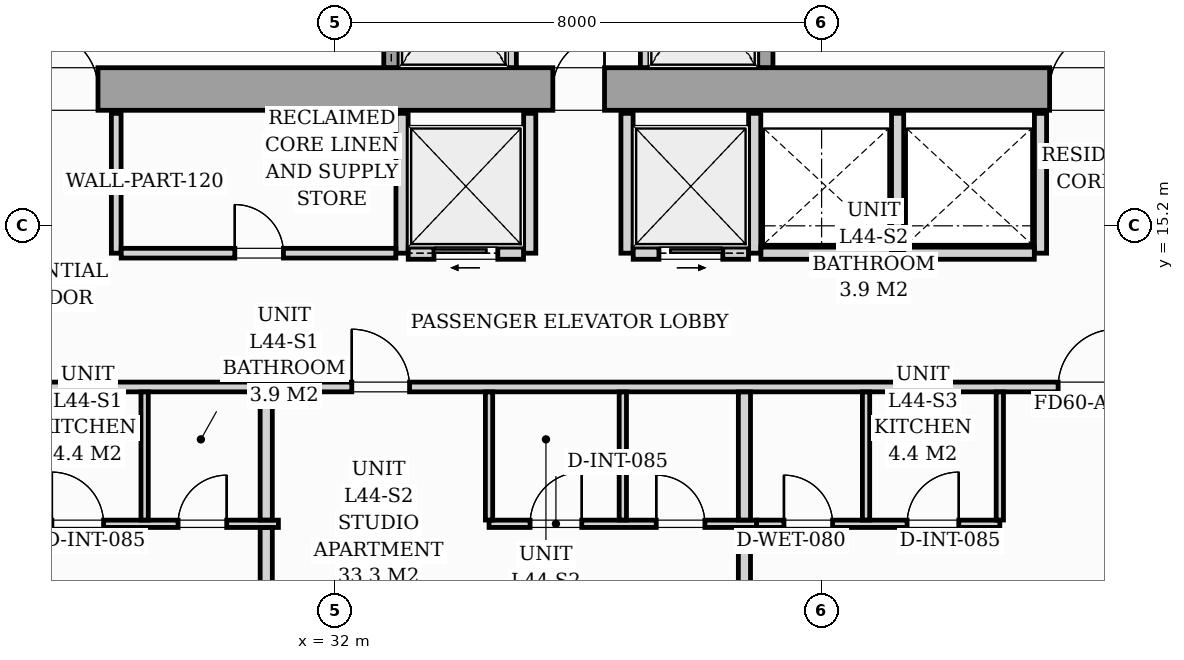
"""IFC4 building model, lengths in metres.
Left out: names, types, materials, properties, quantities, classifications, styles, units other than length and angle.
Written with IfcOpenShell. Run it as: python <this file> out.ifc"""

import sys

from ifc_helpers import new_model, si_unit, direction, frame, frame_2d, origin, origin_2d, place, context, subcontext, project, spatial, rectangle, i_section, extrude, source, transform, mapped, element, fill, save


model = new_model("IFC4")
c1 = context("Model", 3, precision=1e-05, world=origin(), true_north=direction((0.0, 1.0)))
c2 = subcontext(c1, "Body", "Model", "MODEL_VIEW")
j1 = project(units=[si_unit("LENGTHUNIT", "METRE"), si_unit("PLANEANGLEUNIT", "RADIAN")], contexts=[c1])
p1 = place(None, origin())
s1 = spatial("IfcSite", under=j1, at=p1, CompositionType="ELEMENT")
p2 = place(p1, origin())
s2 = spatial("IfcBuilding", under=s1, at=p2, CompositionType="ELEMENT")
p3 = place(p2, frame((0.0, 0.0, 153.4)))
s3 = spatial("IfcBuildingStorey", under=s2, at=p3, CompositionType="ELEMENT", Elevation=153.4)
m1 = source(origin(), c2, "Body", "SweptSolid", [
    extrude(i_section(OverallWidth=0.421, OverallDepth=0.465, WebThickness=0.045, FlangeThickness=0.073, FilletRadius=0.018, at=origin_2d()), origin(), (0.0, 0.0, 1.0), 3.196),
])
for number, where, z_axis, x_axis in (
    (1, (33.12, 17.4, 0.002), (0.0, 0.0, 1.0), (1.0, 0.0, 0.0)),
    (2, (38.88, 17.4, 0.002), (0.0, 0.0, 1.0), (1.0, 0.0, 0.0)),
):
    element("IfcColumn", number, at=place(p3, frame(where, z_axis=z_axis, x_axis=x_axis)), inside=s3, PredefinedType="PILASTER", context=c2, shape_type="MappedRepresentation", body=[
        mapped(m1, transform((0.0, 0.0, 0.0), scale=1.0)),
    ])
p4 = place(p3, frame((26.1, 17.45, 0.0), z_axis=(0.0, 0.0, 1.0), x_axis=(1.0, 0.0, 0.0)))
e3 = element("IfcWall", 3, at=p4, inside=s3, PredefinedType="SHEAR", context=c2, shape_type="SweptSolid", body=[
    extrude(rectangle(XDim=19.8, YDim=0.7, at=frame_2d((9.9, 0.0))), origin(), (0.0, 0.0, 1.0), 3.2),
])
p5 = place(p4, frame((1.05, 0.0, 0.0)))
e4 = element("IfcOpeningElement", 4, at=p5, cuts=e3, PredefinedType="OPENING", context=c2, shape_type="SweptSolid", body=[
    extrude(rectangle(XDim=0.95, YDim=2.06, at=frame_2d((0.475, 1.03))), frame((0.0, 0.36, 0.0), z_axis=(0.0, -1.0, 0.0), x_axis=(1.0, 0.0, 0.0)), (0.0, 0.0, 1.0), 0.72),
])
p6 = place(p4, frame((9.48, 0.0, 0.0)))
e5 = element("IfcOpeningElement", 5, at=p6, cuts=e3, PredefinedType="OPENING", context=c2, shape_type="SweptSolid", body=[
    extrude(rectangle(XDim=0.85, YDim=2.0, at=frame_2d((0.425, 1.0))), frame((0.0, 0.36, 0.0), z_axis=(0.0, -1.0, 0.0), x_axis=(1.0, 0.0, 0.0)), (0.0, 0.0, 1.0), 0.72),
])
p7 = place(p4, frame((17.65, 0.0, 0.0)))
e6 = element("IfcOpeningElement", 6, at=p7, cuts=e3, PredefinedType="OPENING", context=c2, shape_type="SweptSolid", body=[
    extrude(rectangle(XDim=0.95, YDim=2.06, at=frame_2d((0.475, 1.03))), frame((0.0, 0.36, 0.0), z_axis=(0.0, -1.0, 0.0), x_axis=(1.0, 0.0, 0.0)), (0.0, 0.0, 1.0), 0.72),
])
p8 = place(p3, frame((32.925, 17.802, 0.0), z_axis=(0.0, 0.0, 1.0), x_axis=(0.0, 1.0, 0.0)))
e7 = element("IfcWall", 7, at=p8, inside=s3, PredefinedType="SOLIDWALL", context=c2, shape_type="SweptSolid", body=[
    extrude(rectangle(XDim=2.646, YDim=0.25, at=frame_2d((1.323, 0.0))), origin(), (0.0, 0.0, 1.0), 3.2),
])
p9 = place(p8, frame((0.598, 0.0, 0.0)))
e8 = element("IfcOpeningElement", 8, at=p9, cuts=e7, PredefinedType="OPENING", context=c2, shape_type="SweptSolid", body=[
    extrude(rectangle(XDim=1.1, YDim=2.08, at=frame_2d((0.55, 1.04))), frame((0.0, 0.135, 0.0), z_axis=(0.0, -1.0, 0.0), x_axis=(1.0, 0.0, 0.0)), (0.0, 0.0, 1.0), 0.27),
])
for number, where, z_axis, x_axis in (
    (9, (34.9, 17.802, 0.0), (0.0, 0.0, 1.0), (0.0, 1.0, 0.0)),
    (10, (37.1, 17.802, 0.0), (0.0, 0.0, 1.0), (0.0, 1.0, 0.0)),
):
    element("IfcWall", number, at=place(p3, frame(where, z_axis=z_axis, x_axis=x_axis)), inside=s3, PredefinedType="PARTITIONING", context=c2, shape_type="SweptSolid", body=[
        extrude(rectangle(XDim=2.646, YDim=0.16, at=frame_2d((1.323, 0.0))), origin(), (0.0, 0.0, 1.0), 2.94),
    ])
p10 = place(p3, frame((39.075, 17.802, 0.0), z_axis=(0.0, 0.0, 1.0), x_axis=(0.0, 1.0, 0.0)))
e11 = element("IfcWall", 11, at=p10, inside=s3, PredefinedType="SOLIDWALL", context=c2, shape_type="SweptSolid", body=[
    extrude(rectangle(XDim=2.646, YDim=0.25, at=frame_2d((1.323, 0.0))), origin(), (0.0, 0.0, 1.0), 3.2),
])
p11 = place(p10, frame((0.598, 0.0, 0.0)))
e12 = element("IfcOpeningElement", 12, at=p11, cuts=e11, PredefinedType="OPENING", context=c2, shape_type="SweptSolid", body=[
    extrude(rectangle(XDim=1.1, YDim=2.08, at=frame_2d((0.55, 1.04))), frame((0.0, 0.135, 0.0), z_axis=(0.0, -1.0, 0.0), x_axis=(1.0, 0.0, 0.0)), (0.0, 0.0, 1.0), 0.27),
])
p12 = place(p3, frame((28.4, 14.75, 0.0), z_axis=(0.0, 0.0, 1.0), x_axis=(0.0, 1.0, 0.0)))
e13 = element("IfcWall", 13, at=p12, inside=s3, PredefinedType="PARTITIONING", context=c2, shape_type="SweptSolid", body=[
    extrude(rectangle(XDim=2.3, YDim=0.16, at=frame_2d((1.15, 0.0))), origin(), (0.0, 0.0, 1.0), 2.94),
])
p13 = place(p3, frame((33.1, 14.75, 0.0), z_axis=(0.0, 0.0, 1.0), x_axis=(0.0, 1.0, 0.0)))
e14 = element("IfcWall", 14, at=p13, inside=s3, PredefinedType="PARTITIONING", context=c2, shape_type="SweptSolid", body=[
    extrude(rectangle(XDim=2.3, YDim=0.2, at=frame_2d((1.15, 0.0))), origin(), (0.0, 0.0, 1.0), 2.94),
])
p14 = place(p3, frame((28.482, 14.75, 0.0), z_axis=(0.0, 0.0, 1.0), x_axis=(1.0, 0.0, 0.0)))
e15 = element("IfcWall", 15, at=p14, inside=s3, PredefinedType="PARTITIONING", context=c2, shape_type="SweptSolid", body=[
    extrude(rectangle(XDim=4.516, YDim=0.16, at=frame_2d((2.258, 0.0))), origin(), (0.0, 0.0, 1.0), 2.94),
])
p15 = place(p14, frame((1.868, 0.0, 0.0)))
e16 = element("IfcOpeningElement", 16, at=p15, cuts=e15, PredefinedType="OPENING", context=c2, shape_type="SweptSolid", body=[
    extrude(rectangle(XDim=0.8, YDim=2.05, at=frame_2d((0.4, 1.025))), frame((0.0, 0.09, 0.0), z_axis=(0.0, -1.0, 0.0), x_axis=(1.0, 0.0, 0.0)), (0.0, 0.0, 1.0), 0.18),
])
p16 = place(p3, frame((35.2, 14.75, 0.0), z_axis=(0.0, 0.0, 1.0), x_axis=(0.0, 1.0, 0.0)))
e17 = element("IfcWall", 17, at=p16, inside=s3, PredefinedType="PARTITIONING", context=c2, shape_type="SweptSolid", body=[
    extrude(rectangle(XDim=2.3, YDim=0.2, at=frame_2d((1.15, 0.0))), origin(), (0.0, 0.0, 1.0), 2.94),
])
p17 = place(p3, frame((33.202, 14.75, 0.0), z_axis=(0.0, 0.0, 1.0), x_axis=(1.0, 0.0, 0.0)))
e18 = element("IfcWall", 18, at=p17, inside=s3, PredefinedType="PARTITIONING", context=c2, shape_type="SweptSolid", body=[
    extrude(rectangle(XDim=1.896, YDim=0.2, at=frame_2d((0.948, 0.0))), origin(), (0.0, 0.0, 1.0), 2.94),
])
p18 = place(p17, frame((0.423, 0.0, 0.0)))
e19 = element("IfcOpeningElement", 19, at=p18, cuts=e18, PredefinedType="OPENING", context=c2, shape_type="SweptSolid", body=[
    extrude(rectangle(XDim=1.05, YDim=2.08, at=frame_2d((0.525, 1.04))), frame((0.0, 0.11, 0.0), z_axis=(0.0, -1.0, 0.0), x_axis=(1.0, 0.0, 0.0)), (0.0, 0.0, 1.0), 0.22),
])
for number, where, z_axis, x_axis in (
    (20, (36.8, 14.75, 0.0), (0.0, 0.0, 1.0), (0.0, 1.0, 0.0)),
    (21, (38.9, 14.75, 0.0), (0.0, 0.0, 1.0), (0.0, 1.0, 0.0)),
):
    element("IfcWall", number, at=place(p3, frame(where, z_axis=z_axis, x_axis=x_axis)), inside=s3, PredefinedType="PARTITIONING", context=c2, shape_type="SweptSolid", body=[
        extrude(rectangle(XDim=2.3, YDim=0.2, at=frame_2d((1.15, 0.0))), origin(), (0.0, 0.0, 1.0), 2.94),
    ])
p19 = place(p3, frame((36.902, 14.75, 0.0), z_axis=(0.0, 0.0, 1.0), x_axis=(1.0, 0.0, 0.0)))
e22 = element("IfcWall", 22, at=p19, inside=s3, PredefinedType="PARTITIONING", context=c2, shape_type="SweptSolid", body=[
    extrude(rectangle(XDim=1.896, YDim=0.2, at=frame_2d((0.948, 0.0))), origin(), (0.0, 0.0, 1.0), 2.94),
])
p20 = place(p19, frame((0.423, 0.0, 0.0)))
e23 = element("IfcOpeningElement", 23, at=p20, cuts=e22, PredefinedType="OPENING", context=c2, shape_type="SweptSolid", body=[
    extrude(rectangle(XDim=1.05, YDim=2.08, at=frame_2d((0.525, 1.04))), frame((0.0, 0.11, 0.0), z_axis=(0.0, -1.0, 0.0), x_axis=(1.0, 0.0, 0.0)), (0.0, 0.0, 1.0), 0.22),
])
for number, where, z_axis, x_axis in (
    (24, (41.25, 14.75, 0.0), (0.0, 0.0, 1.0), (0.0, 1.0, 0.0)),
    (25, (43.6, 14.75, 0.0), (0.0, 0.0, 1.0), (0.0, 1.0, 0.0)),
):
    element("IfcWall", number, at=place(p3, frame(where, z_axis=z_axis, x_axis=x_axis)), inside=s3, PredefinedType="PARTITIONING", context=c2, shape_type="SweptSolid", body=[
        extrude(rectangle(XDim=2.3, YDim=0.2, at=frame_2d((1.15, 0.0))), origin(), (0.0, 0.0, 1.0), 2.94),
    ])
for number, where, z_axis, x_axis in (
    (26, (39.002, 14.75, 0.0), (0.0, 0.0, 1.0), (1.0, 0.0, 0.0)),
    (27, (41.352, 14.75, 0.0), (0.0, 0.0, 1.0), (1.0, 0.0, 0.0)),
):
    element("IfcWall", number, at=place(p3, frame(where, z_axis=z_axis, x_axis=x_axis)), inside=s3, PredefinedType="PARTITIONING", context=c2, shape_type="SweptSolid", body=[
        extrude(rectangle(XDim=2.146, YDim=0.2, at=frame_2d((1.073, 0.0))), origin(), (0.0, 0.0, 1.0), 2.94),
    ])
p21 = place(p3, frame((22.05, 12.55, 0.0), z_axis=(0.0, 0.0, 1.0), x_axis=(1.0, 0.0, 0.0)))
e28 = element("IfcWall", 28, at=p21, inside=s3, PredefinedType="PARTITIONING", context=c2, shape_type="SweptSolid", body=[
    extrude(rectangle(XDim=23.83, YDim=0.16, at=frame_2d((11.915, 0.0))), origin(), (0.0, 0.0, 1.0), 2.94),
])
p22 = place(p21, frame((1.873, 0.0, 0.0)))
e29 = element("IfcOpeningElement", 29, at=p22, cuts=e28, PredefinedType="OPENING", context=c2, shape_type="SweptSolid", body=[
    extrude(rectangle(XDim=0.95, YDim=2.06, at=frame_2d((0.475, 1.03))), frame((0.0, 0.09, 0.0), z_axis=(0.0, -1.0, 0.0), x_axis=(1.0, 0.0, 0.0)), (0.0, 0.0, 1.0), 0.18),
])
p23 = place(p21, frame((10.224, 0.0, 0.0)))
e30 = element("IfcOpeningElement", 30, at=p23, cuts=e28, PredefinedType="OPENING", context=c2, shape_type="SweptSolid", body=[
    extrude(rectangle(XDim=0.95, YDim=2.06, at=frame_2d((0.475, 1.03))), frame((0.0, 0.09, 0.0), z_axis=(0.0, -1.0, 0.0), x_axis=(1.0, 0.0, 0.0)), (0.0, 0.0, 1.0), 0.18),
])
p24 = place(p21, frame((21.84, 0.0, 0.0)))
e31 = element("IfcOpeningElement", 31, at=p24, cuts=e28, PredefinedType="OPENING", context=c2, shape_type="SweptSolid", body=[
    extrude(rectangle(XDim=0.95, YDim=2.06, at=frame_2d((0.475, 1.03))), frame((0.0, 0.09, 0.0), z_axis=(0.0, -1.0, 0.0), x_axis=(1.0, 0.0, 0.0)), (0.0, 0.0, 1.0), 0.18),
])
p25 = place(p3, frame((26.667, 10.3, 0.0), z_axis=(0.0, 0.0, 1.0), x_axis=(1.0, 0.0, 0.0)))
e32 = element("IfcWall", 32, at=p25, inside=s3, PredefinedType="PARTITIONING", context=c2, shape_type="SweptSolid", body=[
    extrude(rectangle(XDim=4.4, YDim=0.12, at=frame_2d((2.2, 0.0))), origin(), (0.0, 0.0, 1.0), 2.94),
])
p26 = place(p25, frame((0.675, 0.0, 0.0)))
e33 = element("IfcOpeningElement", 33, at=p26, cuts=e32, PredefinedType="OPENING", context=c2, shape_type="SweptSolid", body=[
    extrude(rectangle(XDim=0.85, YDim=2.05, at=frame_2d((0.425, 1.025))), frame((0.0, 0.07, 0.0), z_axis=(0.0, -1.0, 0.0), x_axis=(1.0, 0.0, 0.0)), (0.0, 0.0, 1.0), 0.14),
])
p27 = place(p25, frame((2.75, 0.0, 0.0)))
e34 = element("IfcOpeningElement", 34, at=p27, cuts=e32, PredefinedType="OPENING", context=c2, shape_type="SweptSolid", body=[
    extrude(rectangle(XDim=0.8, YDim=2.02, at=frame_2d((0.4, 1.01))), frame((0.0, 0.07, 0.0), z_axis=(0.0, -1.0, 0.0), x_axis=(1.0, 0.0, 0.0)), (0.0, 0.0, 1.0), 0.14),
])
p28 = place(p3, frame((28.867, 10.362, 0.0), z_axis=(0.0, 0.0, 1.0), x_axis=(0.0, 1.0, 0.0)))
e35 = element("IfcWall", 35, at=p28, inside=s3, PredefinedType="PARTITIONING", context=c2, shape_type="SweptSolid", body=[
    extrude(rectangle(XDim=2.106, YDim=0.12, at=frame_2d((1.053, 0.0))), origin(), (0.0, 0.0, 1.0), 2.94),
])
p29 = place(p3, frame((30.867, 7.221, 0.0), z_axis=(0.0, 0.0, 1.0), x_axis=(0.0, 1.0, 0.0)))
e36 = element("IfcWall", 36, at=p29, inside=s3, PredefinedType="PARTITIONING", context=c2, shape_type="SweptSolid", body=[
    extrude(rectangle(XDim=3.017, YDim=0.2, at=frame_2d((1.508, 0.0))), origin(), (0.0, 0.0, 1.0), 2.94),
])
p30 = place(p3, frame((30.867, 10.362, 0.0), z_axis=(0.0, 0.0, 1.0), x_axis=(0.0, 1.0, 0.0)))
e37 = element("IfcWall", 37, at=p30, inside=s3, PredefinedType="PARTITIONING", context=c2, shape_type="SweptSolid", body=[
    extrude(rectangle(XDim=2.106, YDim=0.2, at=frame_2d((1.053, 0.0))), origin(), (0.0, 0.0, 1.0), 2.94),
])
p31 = place(p3, frame((34.531, 10.3, 0.0), z_axis=(0.0, 0.0, 1.0), x_axis=(1.0, 0.0, 0.0)))
e38 = element("IfcWall", 38, at=p31, inside=s3, PredefinedType="PARTITIONING", context=c2, shape_type="SweptSolid", body=[
    extrude(rectangle(XDim=4.4, YDim=0.12, at=frame_2d((2.2, 0.0))), origin(), (0.0, 0.0, 1.0), 2.94),
])
p32 = place(p31, frame((0.675, 0.0, 0.0)))
e39 = element("IfcOpeningElement", 39, at=p32, cuts=e38, PredefinedType="OPENING", context=c2, shape_type="SweptSolid", body=[
    extrude(rectangle(XDim=0.85, YDim=2.05, at=frame_2d((0.425, 1.025))), frame((0.0, 0.07, 0.0), z_axis=(0.0, -1.0, 0.0), x_axis=(1.0, 0.0, 0.0)), (0.0, 0.0, 1.0), 0.14),
])
p33 = place(p31, frame((2.75, 0.0, 0.0)))
e40 = element("IfcOpeningElement", 40, at=p33, cuts=e38, PredefinedType="OPENING", context=c2, shape_type="SweptSolid", body=[
    extrude(rectangle(XDim=0.8, YDim=2.02, at=frame_2d((0.4, 1.01))), frame((0.0, 0.07, 0.0), z_axis=(0.0, -1.0, 0.0), x_axis=(1.0, 0.0, 0.0)), (0.0, 0.0, 1.0), 0.14),
])
for number, where, z_axis, x_axis in (
    (41, (34.531, 10.362, 0.0), (0.0, 0.0, 1.0), (0.0, 1.0, 0.0)),
    (42, (36.731, 10.362, 0.0), (0.0, 0.0, 1.0), (0.0, 1.0, 0.0)),
):
    element("IfcWall", number, at=place(p3, frame(where, z_axis=z_axis, x_axis=x_axis)), inside=s3, PredefinedType="PARTITIONING", context=c2, shape_type="SweptSolid", body=[
        extrude(rectangle(XDim=2.106, YDim=0.12, at=frame_2d((1.053, 0.0))), origin(), (0.0, 0.0, 1.0), 2.94),
    ])
p34 = place(p3, frame((38.731, 6.464, 0.0), z_axis=(0.0, 0.0, 1.0), x_axis=(0.0, 1.0, 0.0)))
e43 = element("IfcWall", 43, at=p34, inside=s3, PredefinedType="PARTITIONING", context=c2, shape_type="SweptSolid", body=[
    extrude(rectangle(XDim=3.774, YDim=0.2, at=frame_2d((1.887, 0.0))), origin(), (0.0, 0.0, 1.0), 2.94),
])
p35 = place(p3, frame((38.731, 10.362, 0.0), z_axis=(0.0, 0.0, 1.0), x_axis=(0.0, 1.0, 0.0)))
e44 = element("IfcWall", 44, at=p35, inside=s3, PredefinedType="PARTITIONING", context=c2, shape_type="SweptSolid", body=[
    extrude(rectangle(XDim=2.106, YDim=0.2, at=frame_2d((1.053, 0.0))), origin(), (0.0, 0.0, 1.0), 2.94),
])
p36 = place(p3, frame((38.931, 10.3, 0.0), z_axis=(0.0, 0.0, 1.0), x_axis=(1.0, 0.0, 0.0)))
e45 = element("IfcWall", 45, at=p36, inside=s3, PredefinedType="PARTITIONING", context=c2, shape_type="SweptSolid", body=[
    extrude(rectangle(XDim=4.0, YDim=0.12, at=frame_2d((2.0, 0.0))), origin(), (0.0, 0.0, 1.0), 2.94),
])
p37 = place(p36, frame((0.45, 0.0, 0.0)))
e46 = element("IfcOpeningElement", 46, at=p37, cuts=e45, PredefinedType="OPENING", context=c2, shape_type="SweptSolid", body=[
    extrude(rectangle(XDim=0.8, YDim=2.02, at=frame_2d((0.4, 1.01))), frame((0.0, 0.07, 0.0), z_axis=(0.0, -1.0, 0.0), x_axis=(1.0, 0.0, 0.0)), (0.0, 0.0, 1.0), 0.14),
])
p38 = place(p36, frame((2.475, 0.0, 0.0)))
e47 = element("IfcOpeningElement", 47, at=p38, cuts=e45, PredefinedType="OPENING", context=c2, shape_type="SweptSolid", body=[
    extrude(rectangle(XDim=0.85, YDim=2.05, at=frame_2d((0.425, 1.025))), frame((0.0, 0.07, 0.0), z_axis=(0.0, -1.0, 0.0), x_axis=(1.0, 0.0, 0.0)), (0.0, 0.0, 1.0), 0.14),
])
for number, where, z_axis, x_axis in (
    (48, (42.931, 10.362, 0.0), (0.0, 0.0, 1.0), (0.0, 1.0, 0.0)),
    (49, (40.731, 10.362, 0.0), (0.0, 0.0, 1.0), (0.0, 1.0, 0.0)),
):
    element("IfcWall", number, at=place(p3, frame(where, z_axis=z_axis, x_axis=x_axis)), inside=s3, PredefinedType="PARTITIONING", context=c2, shape_type="SweptSolid", body=[
        extrude(rectangle(XDim=2.106, YDim=0.12, at=frame_2d((1.053, 0.0))), origin(), (0.0, 0.0, 1.0), 2.94),
    ])
m2 = source(origin(), c2, "Body", "SweptSolid", [
    extrude(rectangle(XDim=0.95, YDim=2.06, at=frame_2d((0.475, 1.03))), frame((0.0, 0.025, 0.0), z_axis=(0.0, -1.0, 0.0), x_axis=(1.0, 0.0, 0.0)), (0.0, 0.0, 1.0), 0.05),
])
p39 = place(p5, origin())
e50 = element("IfcDoor", 50, at=p39, inside=s3, OperationType="SINGLE_SWING_LEFT", PredefinedType="DOOR", context=c2, shape_type="MappedRepresentation", body=[
    mapped(m2, transform((0.0, 0.0, 0.0), scale=1.0)),
])
fill(e4, e50)
m3 = source(origin(), c2, "Body", "SweptSolid", [
    extrude(rectangle(XDim=0.85, YDim=2.0, at=frame_2d((0.425, 1.0))), frame((0.0, 0.025, 0.0), z_axis=(0.0, -1.0, 0.0), x_axis=(1.0, 0.0, 0.0)), (0.0, 0.0, 1.0), 0.05),
])
p40 = place(p6, origin())
e51 = element("IfcDoor", 51, at=p40, inside=s3, OperationType="SINGLE_SWING_RIGHT", PredefinedType="DOOR", context=c2, shape_type="MappedRepresentation", body=[
    mapped(m3, transform((0.0, 0.0, 0.0), scale=1.0)),
])
fill(e5, e51)
p41 = place(p7, origin())
e52 = element("IfcDoor", 52, at=p41, inside=s3, OperationType="SINGLE_SWING_RIGHT", PredefinedType="DOOR", context=c2, shape_type="MappedRepresentation", body=[
    mapped(m2, transform((0.0, 0.0, 0.0), scale=1.0)),
])
fill(e6, e52)
m4 = source(origin(), c2, "Body", "SweptSolid", [
    extrude(rectangle(XDim=0.8, YDim=2.05, at=frame_2d((0.4, 1.025))), frame((0.0, 0.025, 0.0), z_axis=(0.0, -1.0, 0.0), x_axis=(1.0, 0.0, 0.0)), (0.0, 0.0, 1.0), 0.05),
])
p42 = place(p15, origin())
e53 = element("IfcDoor", 53, at=p42, inside=s3, OperationType="SINGLE_SWING_LEFT", PredefinedType="DOOR", context=c2, shape_type="MappedRepresentation", body=[
    mapped(m4, transform((0.0, 0.0, 0.0), scale=1.0)),
])
fill(e16, e53)
m5 = source(origin(), c2, "Body", "SweptSolid", [
    extrude(rectangle(XDim=1.05, YDim=2.08, at=frame_2d((0.525, 1.04))), frame((0.0, 0.025, 0.0), z_axis=(0.0, -1.0, 0.0), x_axis=(1.0, 0.0, 0.0)), (0.0, 0.0, 1.0), 0.05),
])
p43 = place(p18, origin())
e54 = element("IfcDoor", 54, at=p43, inside=s3, OperationType="SLIDING_TO_LEFT", PredefinedType="DOOR", context=c2, shape_type="MappedRepresentation", body=[
    mapped(m5, transform((0.0, 0.0, 0.0), scale=1.0)),
])
fill(e19, e54)
p44 = place(p20, origin())
e55 = element("IfcDoor", 55, at=p44, inside=s3, OperationType="SLIDING_TO_RIGHT", PredefinedType="DOOR", context=c2, shape_type="MappedRepresentation", body=[
    mapped(m5, transform((0.0, 0.0, 0.0), scale=1.0)),
])
fill(e23, e55)
m6 = source(origin(), c2, "Body", "SweptSolid", [
    extrude(rectangle(XDim=0.85, YDim=2.05, at=frame_2d((0.425, 1.025))), frame((0.0, 0.025, 0.0), z_axis=(0.0, -1.0, 0.0), x_axis=(1.0, 0.0, 0.0)), (0.0, 0.0, 1.0), 0.05),
])
p45 = place(p26, origin())
e56 = element("IfcDoor", 56, at=p45, inside=s3, OperationType="SINGLE_SWING_LEFT", PredefinedType="DOOR", context=c2, shape_type="MappedRepresentation", body=[
    mapped(m6, transform((0.0, 0.0, 0.0), scale=1.0)),
])
fill(e33, e56)
m7 = source(origin(), c2, "Body", "SweptSolid", [
    extrude(rectangle(XDim=0.8, YDim=2.02, at=frame_2d((0.4, 1.01))), frame((0.0, 0.025, 0.0), z_axis=(0.0, -1.0, 0.0), x_axis=(1.0, 0.0, 0.0)), (0.0, 0.0, 1.0), 0.05),
])
p46 = place(p27, origin())
e57 = element("IfcDoor", 57, at=p46, inside=s3, OperationType="SINGLE_SWING_RIGHT", PredefinedType="DOOR", context=c2, shape_type="MappedRepresentation", body=[
    mapped(m7, transform((0.0, 0.0, 0.0), scale=1.0)),
])
fill(e34, e57)
m8 = source(origin(), c2, "Body", "SweptSolid", [
    extrude(rectangle(XDim=0.95, YDim=2.06, at=frame_2d((0.475, 1.03))), frame((0.0, 0.025, 0.0), z_axis=(0.0, -1.0, 0.0), x_axis=(1.0, 0.0, 0.0)), (0.0, 0.0, 1.0), 0.05),
])
p47 = place(p23, origin())
e58 = element("IfcDoor", 58, at=p47, inside=s3, OperationType="SINGLE_SWING_LEFT", PredefinedType="DOOR", context=c2, shape_type="MappedRepresentation", body=[
    mapped(m8, transform((0.0, 0.0, 0.0), scale=1.0)),
])
fill(e30, e58)
p48 = place(p32, origin())
e59 = element("IfcDoor", 59, at=p48, inside=s3, OperationType="SINGLE_SWING_RIGHT", PredefinedType="DOOR", context=c2, shape_type="MappedRepresentation", body=[
    mapped(m6, transform((0.0, 0.0, 0.0), scale=1.0)),
])
fill(e39, e59)
p49 = place(p33, origin())
e60 = element("IfcDoor", 60, at=p49, inside=s3, OperationType="SINGLE_SWING_LEFT", PredefinedType="DOOR", context=c2, shape_type="MappedRepresentation", body=[
    mapped(m7, transform((0.0, 0.0, 0.0), scale=1.0)),
])
fill(e40, e60)
p50 = place(p24, origin())
e61 = element("IfcDoor", 61, at=p50, inside=s3, OperationType="SINGLE_SWING_RIGHT", PredefinedType="DOOR", context=c2, shape_type="MappedRepresentation", body=[
    mapped(m8, transform((0.0, 0.0, 0.0), scale=1.0)),
])
fill(e31, e61)
p51 = place(p37, origin())
e62 = element("IfcDoor", 62, at=p51, inside=s3, OperationType="SINGLE_SWING_LEFT", PredefinedType="DOOR", context=c2, shape_type="MappedRepresentation", body=[
    mapped(m7, transform((0.0, 0.0, 0.0), scale=1.0)),
])
fill(e46, e62)
p52 = place(p38, origin())
e63 = element("IfcDoor", 63, at=p52, inside=s3, OperationType="SINGLE_SWING_RIGHT", PredefinedType="DOOR", context=c2, shape_type="MappedRepresentation", body=[
    mapped(m6, transform((0.0, 0.0, 0.0), scale=1.0)),
])
fill(e47, e63)
save(model, sys.argv[1])
